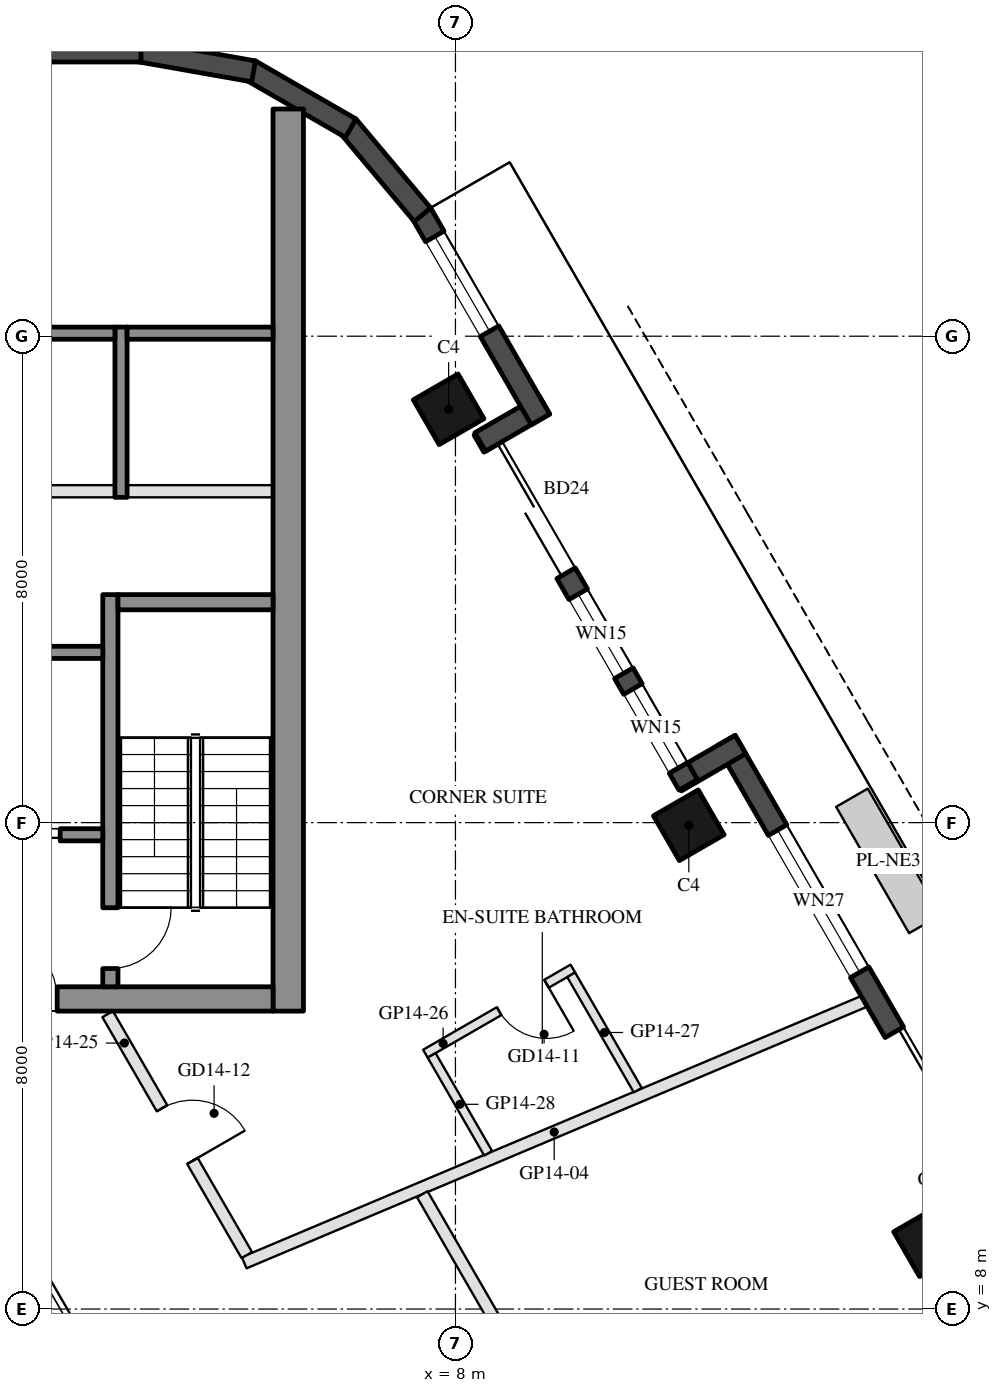
"""IFC4 building model, lengths in metres.
Left out: names, types, materials, properties, quantities, classifications, styles, units other than length and angle.
Written with IfcOpenShell. Run it as: python <this file> out.ifc"""

import sys

from ifc_helpers import new_model, si_unit, direction, frame, frame_2d, origin, origin_2d, place, context, subcontext, project, spatial, rectangle, hollow_rectangle, extrude, element, fill, save


model = new_model("IFC4")
c1 = context("Model", 3, precision=1e-05, world=origin(), true_north=direction((0.0, 1.0)))
c2 = subcontext(c1, "Body", "Model", "MODEL_VIEW")
j1 = project(units=[si_unit("LENGTHUNIT", "METRE"), si_unit("PLANEANGLEUNIT", "RADIAN")], contexts=[c1])
p1 = place(None, origin())
s1 = spatial("IfcSite", under=j1, at=p1, CompositionType="ELEMENT")
p2 = place(p1, origin())
s2 = spatial("IfcBuilding", under=s1, at=p2, CompositionType="ELEMENT")
p3 = place(p2, frame((0.0, 0.0, 165.1)))
s3 = spatial("IfcBuildingStorey", under=s2, at=p3, CompositionType="ELEMENT", Elevation=165.1)
for number, where, z_axis, x_axis in (
    (1, (15.788, 9.115, 0.0), (0.0, 0.0, 1.0), (-0.5, 0.866, 0.0)),
    (2, (11.838, 15.957, 0.0), (0.0, 0.0, 1.0), (-0.5, 0.866, 0.0)),
    (3, (7.888, 22.798, 0.0), (0.0, 0.0, 1.0), (-0.5, 0.866, 0.0)),
):
    element("IfcColumn", number, at=place(p3, frame(where, z_axis=z_axis, x_axis=x_axis)), inside=s3, PredefinedType="COLUMN", context=c2, shape_type="SweptSolid", body=[
        extrude(hollow_rectangle(XDim=0.85, YDim=0.85, WallThickness=0.04, at=origin_2d()), origin(), (0.0, 0.0, 1.0), 3.7),
    ])
p4 = place(p3, frame((17.299, 8.948, 0.0), z_axis=(0.0, 0.0, 1.0), x_axis=(-0.500010041276, 0.866019606374, 0.0)))
e4 = element("IfcWall", 4, at=p4, inside=s3, PredefinedType="SOLIDWALL", context=c2, shape_type="SweptSolid", body=[
    extrude(rectangle(XDim=9.7, YDim=0.35, at=frame_2d((4.85, 0.0))), origin(), (0.0, 0.0, 1.0), 3.55),
])
p5 = place(p4, frame((1.762, 0.0, 0.0)))
e5 = element("IfcOpeningElement", 5, at=p5, cuts=e4, PredefinedType="OPENING", context=c2, shape_type="SweptSolid", body=[
    extrude(rectangle(XDim=2.4, YDim=2.4, at=frame_2d((1.2, 1.2))), frame((0.0, 0.185, 0.0), z_axis=(0.0, -1.0, 0.0), x_axis=(1.0, 0.0, 0.0)), (0.0, 0.0, 1.0), 0.37),
])
p6 = place(p4, frame((5.301, 0.0, 0.3)))
e6 = element("IfcOpeningElement", 6, at=p6, cuts=e4, PredefinedType="OPENING", context=c2, shape_type="SweptSolid", body=[
    extrude(rectangle(XDim=2.7, YDim=2.65, at=frame_2d((1.35, 1.325))), frame((0.0, 0.185, 0.0), z_axis=(0.0, -1.0, 0.0), x_axis=(1.0, 0.0, 0.0)), (0.0, 0.0, 1.0), 0.37),
])
p7 = place(p3, frame((12.688, 17.284, 0.0), z_axis=(0.0, 0.0, 1.0), x_axis=(-0.865955602162, -0.500120880472, 0.0)))
e7 = element("IfcWall", 7, at=p7, inside=s3, PredefinedType="SOLIDWALL", context=c2, shape_type="SweptSolid", body=[
    extrude(rectangle(XDim=1.22, YDim=0.35, at=frame_2d((0.61, 0.0))), origin(), (0.0, 0.0, 1.0), 3.55),
])
p8 = place(p3, frame((11.829, 16.621, 0.0), z_axis=(0.0, 0.0, 1.0), x_axis=(-0.500003597184, 0.866023326939, 0.0)))
e8 = element("IfcWall", 8, at=p8, inside=s3, PredefinedType="SOLIDWALL", context=c2, shape_type="SweptSolid", body=[
    extrude(rectangle(XDim=6.74, YDim=0.35, at=frame_2d((3.37, 0.0))), origin(), (0.0, 0.0, 1.0), 3.55),
])
p9 = place(p8, frame((4.02, 0.0, 0.0)))
e9 = element("IfcOpeningElement", 9, at=p9, cuts=e8, PredefinedType="OPENING", context=c2, shape_type="SweptSolid", body=[
    extrude(rectangle(XDim=2.4, YDim=2.4, at=frame_2d((1.2, 1.2))), frame((0.0, 0.185, 0.0), z_axis=(0.0, -1.0, 0.0), x_axis=(1.0, 0.0, 0.0)), (0.0, 0.0, 1.0), 0.37),
])
p10 = place(p8, frame((0.32, 0.0, 0.3)))
e10 = element("IfcOpeningElement", 10, at=p10, cuts=e8, PredefinedType="OPENING", context=c2, shape_type="SweptSolid", body=[
    extrude(rectangle(XDim=1.5, YDim=2.65, at=frame_2d((0.75, 1.325))), frame((0.0, 0.185, 0.0), z_axis=(0.0, -1.0, 0.0), x_axis=(1.0, 0.0, 0.0)), (0.0, 0.0, 1.0), 0.37),
])
p11 = place(p8, frame((2.12, 0.0, 0.3)))
e11 = element("IfcOpeningElement", 11, at=p11, cuts=e8, PredefinedType="OPENING", context=c2, shape_type="SweptSolid", body=[
    extrude(rectangle(XDim=1.5, YDim=2.65, at=frame_2d((0.75, 1.325))), frame((0.0, 0.185, 0.0), z_axis=(0.0, -1.0, 0.0), x_axis=(1.0, 0.0, 0.0)), (0.0, 0.0, 1.0), 0.37),
])
p12 = place(p3, frame((8.406, 22.26, 0.0), z_axis=(0.0, 0.0, 1.0), x_axis=(0.865955602162, 0.500120880472, 0.0)))
e12 = element("IfcWall", 12, at=p12, inside=s3, PredefinedType="SOLIDWALL", context=c2, shape_type="SweptSolid", body=[
    extrude(rectangle(XDim=1.22, YDim=0.35, at=frame_2d((0.61, 0.0))), origin(), (0.0, 0.0, 1.0), 3.55),
])
p13 = place(p3, frame((9.398, 22.631, 0.0), z_axis=(0.0, 0.0, 1.0), x_axis=(-0.499954521343, 0.866051659307, 0.0)))
e13 = element("IfcWall", 13, at=p13, inside=s3, PredefinedType="SOLIDWALL", context=c2, shape_type="SweptSolid", body=[
    extrude(rectangle(XDim=3.916, YDim=0.35, at=frame_2d((1.958, 0.0))), origin(), (0.0, 0.0, 1.0), 3.55),
])
p14 = place(p13, frame((1.675, 0.0, 0.3)))
e14 = element("IfcOpeningElement", 14, at=p14, cuts=e13, PredefinedType="OPENING", context=c2, shape_type="SweptSolid", body=[
    extrude(rectangle(XDim=1.8, YDim=2.65, at=frame_2d((0.9, 1.325))), frame((0.0, 0.185, 0.0), z_axis=(0.0, -1.0, 0.0), x_axis=(1.0, 0.0, 0.0)), (0.0, 0.0, 1.0), 0.37),
])
p15 = place(p3, frame((7.458, 25.998, 0.0), z_axis=(0.0, 0.0, 1.0), x_axis=(-0.642808304945, 0.766027077259, 0.0)))
e15 = element("IfcWall", 15, at=p15, inside=s3, PredefinedType="SOLIDWALL", context=c2, shape_type="SweptSolid", body=[
    extrude(rectangle(XDim=1.91, YDim=0.35, at=frame_2d((0.955, 0.0))), origin(), (0.0, 0.0, 1.0), 3.55),
])
for number, where, z_axis, x_axis in (
    (16, (6.277, 27.422, 0.0), (0.0, 0.0, 1.0), (-0.866, 0.5, 0.0)),
    (17, (4.68, 28.356, 0.0), (0.0, 0.0, 1.0), (-0.985, 0.174, 0.0)),
):
    element("IfcWall", number, at=place(p3, frame(where, z_axis=z_axis, x_axis=x_axis)), inside=s3, PredefinedType="SOLIDWALL", context=c2, shape_type="SweptSolid", body=[
        extrude(rectangle(XDim=1.91, YDim=0.35, at=frame_2d((0.955, 0.0))), origin(), (0.0, 0.0, 1.0), 3.55),
    ])
p16 = place(p3, frame((2.829, 28.685, 0.0), z_axis=(0.0, 0.0, 1.0), x_axis=(-1.0, 0.0, 0.0)))
e18 = element("IfcWall", 18, at=p16, inside=s3, PredefinedType="SOLIDWALL", context=c2, shape_type="SweptSolid", body=[
    extrude(rectangle(XDim=5.658, YDim=0.35, at=frame_2d((2.829, 0.0))), origin(), (0.0, 0.0, 1.0), 3.55),
])
p17 = place(p3, frame((5.25, 12.9, 0.0), z_axis=(0.0, 0.0, 1.0), x_axis=(0.0, 1.0, 0.0)))
e19 = element("IfcWall", 19, at=p17, inside=s3, PredefinedType="SHEAR", context=c2, shape_type="SweptSolid", body=[
    extrude(rectangle(XDim=14.837, YDim=0.5, at=frame_2d((7.418, 0.0))), origin(), (0.0, 0.0, 1.0), 3.5),
])
p18 = place(p3, frame((5.0, 13.1, 0.0), z_axis=(0.0, 0.0, 1.0), x_axis=(-1.0, 0.0, 0.0)))
e20 = element("IfcWall", 20, at=p18, inside=s3, PredefinedType="SHEAR", context=c2, shape_type="SweptSolid", body=[
    extrude(rectangle(XDim=10.0, YDim=0.4, at=frame_2d((5.0, 0.0))), origin(), (0.0, 0.0, 1.0), 3.5),
])
p19 = place(p18, frame((3.55, 0.0, 0.0)))
e21 = element("IfcOpeningElement", 21, at=p19, cuts=e20, PredefinedType="OPENING", context=c2, shape_type="SweptSolid", body=[
    extrude(rectangle(XDim=1.1, YDim=2.1, at=frame_2d((0.55, 1.05))), frame((0.0, 0.21, 0.0), z_axis=(0.0, -1.0, 0.0), x_axis=(1.0, 0.0, 0.0)), (0.0, 0.0, 1.0), 0.42),
])
p20 = place(p18, frame((5.85, 0.0, 0.0)))
e22 = element("IfcOpeningElement", 22, at=p20, cuts=e20, PredefinedType="OPENING", context=c2, shape_type="SweptSolid", body=[
    extrude(rectangle(XDim=1.4, YDim=2.1, at=frame_2d((0.7, 1.05))), frame((0.0, 0.21, 0.0), z_axis=(0.0, -1.0, 0.0), x_axis=(1.0, 0.0, 0.0)), (0.0, 0.0, 1.0), 0.42),
])
p21 = place(p3, frame((2.325, 13.3, 0.0), z_axis=(0.0, 0.0, 1.0), x_axis=(0.0, 1.0, 0.0)))
e23 = element("IfcWall", 23, at=p21, inside=s3, PredefinedType="SHEAR", context=c2, shape_type="SweptSolid", body=[
    extrude(rectangle(XDim=6.45, YDim=0.25, at=frame_2d((3.225, 0.0))), origin(), (0.0, 0.0, 1.0), 3.5),
])
p22 = place(p21, frame((0.3, 0.0, 0.0)))
e24 = element("IfcOpeningElement", 24, at=p22, cuts=e23, PredefinedType="OPENING", context=c2, shape_type="SweptSolid", body=[
    extrude(rectangle(XDim=1.0, YDim=2.1, at=frame_2d((0.5, 1.05))), frame((0.0, 0.135, 0.0), z_axis=(0.0, -1.0, 0.0), x_axis=(1.0, 0.0, 0.0)), (0.0, 0.0, 1.0), 0.27),
])
p23 = place(p3, frame((5.0, 19.625, 0.0), z_axis=(0.0, 0.0, 1.0), x_axis=(-1.0, 0.0, 0.0)))
e25 = element("IfcWall", 25, at=p23, inside=s3, PredefinedType="SHEAR", context=c2, shape_type="SweptSolid", body=[
    extrude(rectangle(XDim=2.55, YDim=0.25, at=frame_2d((1.275, 0.0))), origin(), (0.0, 0.0, 1.0), 3.5),
])
p24 = place(p3, frame((2.2, 18.8, 0.0), z_axis=(0.0, 0.0, 1.0), x_axis=(-1.0, 0.0, 0.0)))
e26 = element("IfcWall", 26, at=p24, inside=s3, PredefinedType="SHEAR", context=c2, shape_type="SweptSolid", body=[
    extrude(rectangle(XDim=2.8, YDim=0.2, at=frame_2d((1.4, 0.0))), origin(), (0.0, 0.0, 1.0), 3.5),
])
p25 = place(p3, frame((2.2, 15.8, 0.0), z_axis=(0.0, 0.0, 1.0), x_axis=(-1.0, 0.0, 0.0)))
e27 = element("IfcWall", 27, at=p25, inside=s3, PredefinedType="SHEAR", context=c2, shape_type="SweptSolid", body=[
    extrude(rectangle(XDim=2.8, YDim=0.2, at=frame_2d((1.4, 0.0))), origin(), (0.0, 0.0, 1.0), 3.5),
])
p26 = place(p25, frame((0.7, 0.0, 0.0)))
e28 = element("IfcOpeningElement", 28, at=p26, cuts=e27, PredefinedType="OPENING", context=c2, shape_type="SweptSolid", body=[
    extrude(rectangle(XDim=1.2, YDim=2.1, at=frame_2d((0.6, 1.05))), frame((0.0, 0.11, 0.0), z_axis=(0.0, -1.0, 0.0), x_axis=(1.0, 0.0, 0.0)), (0.0, 0.0, 1.0), 0.22),
])
p27 = place(p3, frame((2.5, 21.35, 0.0), z_axis=(0.0, 0.0, 1.0), x_axis=(0.0, 1.0, 0.0)))
e29 = element("IfcWall", 29, at=p27, inside=s3, PredefinedType="SHEAR", context=c2, shape_type="SweptSolid", body=[
    extrude(rectangle(XDim=2.8, YDim=0.2, at=frame_2d((1.4, 0.0))), origin(), (0.0, 0.0, 1.0), 3.5),
])
p28 = place(p3, frame((5.0, 24.05, 0.0), z_axis=(0.0, 0.0, 1.0), x_axis=(-1.0, 0.0, 0.0)))
e30 = element("IfcWall", 30, at=p28, inside=s3, PredefinedType="SHEAR", context=c2, shape_type="SweptSolid", body=[
    extrude(rectangle(XDim=2.4, YDim=0.2, at=frame_2d((1.2, 0.0))), origin(), (0.0, 0.0, 1.0), 3.5),
])
p29 = place(p3, frame((2.4, 24.05, 0.0), z_axis=(0.0, 0.0, 1.0), x_axis=(-1.0, 0.0, 0.0)))
e31 = element("IfcWall", 31, at=p29, inside=s3, PredefinedType="SHEAR", context=c2, shape_type="SweptSolid", body=[
    extrude(rectangle(XDim=2.8, YDim=0.2, at=frame_2d((1.4, 0.0))), origin(), (0.0, 0.0, 1.0), 3.5),
])
p30 = place(p3, frame((5.0, 21.45, 0.0), z_axis=(0.0, 0.0, 1.0), x_axis=(-1.0, 0.0, 0.0)))
e32 = element("IfcWall", 32, at=p30, inside=s3, PredefinedType="PARTITIONING", context=c2, shape_type="SweptSolid", body=[
    extrude(rectangle(XDim=2.4, YDim=0.2, at=frame_2d((1.2, 0.0))), origin(), (0.0, 0.0, 1.0), 3.5),
])
p31 = place(p3, frame((2.4, 21.45, 0.0), z_axis=(0.0, 0.0, 1.0), x_axis=(-1.0, 0.0, 0.0)))
e33 = element("IfcWall", 33, at=p31, inside=s3, PredefinedType="PARTITIONING", context=c2, shape_type="SweptSolid", body=[
    extrude(rectangle(XDim=2.8, YDim=0.2, at=frame_2d((1.4, 0.0))), origin(), (0.0, 0.0, 1.0), 3.5),
])
p32 = place(p3, frame((14.722, 13.061, 0.0), z_axis=(0.0, 0.0, 1.0), x_axis=(-0.921447968583, -0.388501790465, 0.0)))
e34 = element("IfcWall", 34, at=p32, inside=s3, PredefinedType="PARTITIONING", context=c2, shape_type="SweptSolid", body=[
    extrude(rectangle(XDim=11.066, YDim=0.2, at=frame_2d((5.533, 0.0))), origin(), (0.0, 0.0, 1.0), 2.95),
])
p33 = place(p3, frame((7.455, 9.888, 0.0), z_axis=(0.0, 0.0, 1.0), x_axis=(0.499995688794, -0.866027892846, 0.0)))
e35 = element("IfcWall", 35, at=p33, inside=s3, PredefinedType="PARTITIONING", context=c2, shape_type="SweptSolid", body=[
    extrude(rectangle(XDim=9.307, YDim=0.2, at=frame_2d((4.654, 0.0))), origin(), (0.0, 0.0, 1.0), 2.95),
])
p34 = place(p33, frame((5.849, 0.0, 0.0)))
e36 = element("IfcOpeningElement", 36, at=p34, cuts=e35, PredefinedType="OPENING", context=c2, shape_type="SweptSolid", body=[
    extrude(rectangle(XDim=1.0, YDim=2.1, at=frame_2d((0.5, 1.05))), frame((0.0, 0.11, 0.0), z_axis=(0.0, -1.0, 0.0), x_axis=(1.0, 0.0, 0.0)), (0.0, 0.0, 1.0), 0.22),
])
p35 = place(p3, frame((2.281, 12.85, 0.0), z_axis=(0.0, 0.0, 1.0), x_axis=(0.500030411023, -0.86600784526, 0.0)))
e37 = element("IfcWall", 37, at=p35, inside=s3, PredefinedType="PARTITIONING", context=c2, shape_type="SweptSolid", body=[
    extrude(rectangle(XDim=4.575, YDim=0.2, at=frame_2d((2.288, 0.0))), origin(), (0.0, 0.0, 1.0), 2.95),
])
p36 = place(p35, frame((1.787, 0.0, 0.0)))
e38 = element("IfcOpeningElement", 38, at=p36, cuts=e37, PredefinedType="OPENING", context=c2, shape_type="SweptSolid", body=[
    extrude(rectangle(XDim=1.0, YDim=2.1, at=frame_2d((0.5, 1.05))), frame((0.0, 0.11, 0.0), z_axis=(0.0, -1.0, 0.0), x_axis=(1.0, 0.0, 0.0)), (0.0, 0.0, 1.0), 0.22),
])
p37 = place(p3, frame((9.931, 13.6, 0.0), z_axis=(0.0, 0.0, 1.0), x_axis=(-0.866034573852, -0.49998411664, 0.0)))
e39 = element("IfcWall", 39, at=p37, inside=s3, PredefinedType="PARTITIONING", context=c2, shape_type="SweptSolid", body=[
    extrude(rectangle(XDim=2.8, YDim=0.15, at=frame_2d((1.4, 0.0))), origin(), (0.0, 0.0, 1.0), 3.55),
])
p38 = place(p37, frame((0.5, 0.0, 0.0)))
e40 = element("IfcOpeningElement", 40, at=p38, cuts=e39, PredefinedType="OPENING", context=c2, shape_type="SweptSolid", body=[
    extrude(rectangle(XDim=0.9, YDim=2.1, at=frame_2d((0.45, 1.05))), frame((0.0, 0.085, 0.0), z_axis=(0.0, -1.0, 0.0), x_axis=(1.0, 0.0, 0.0)), (0.0, 0.0, 1.0), 0.17),
])
p39 = place(p3, frame((10.999, 11.6, 0.0), z_axis=(0.0, 0.0, 1.0), x_axis=(-0.499937856693, 0.866061279267, 0.0)))
e41 = element("IfcWall", 41, at=p39, inside=s3, PredefinedType="PARTITIONING", context=c2, shape_type="SweptSolid", body=[
    extrude(rectangle(XDim=2.191, YDim=0.15, at=frame_2d((1.096, 0.0))), origin(), (0.0, 0.0, 1.0), 3.55),
])
p40 = place(p3, frame((8.538, 10.562, 0.0), z_axis=(0.0, 0.0, 1.0), x_axis=(-0.500036928615, 0.866004081989, 0.0)))
e42 = element("IfcWall", 42, at=p40, inside=s3, PredefinedType="PARTITIONING", context=c2, shape_type="SweptSolid", body=[
    extrude(rectangle(XDim=1.859, YDim=0.15, at=frame_2d((0.93, 0.0))), origin(), (0.0, 0.0, 1.0), 3.55),
])
p41 = place(p5, frame((2.4, 0.0, 0.0), z_axis=(0.0, 0.0, 1.0), x_axis=(-1.0, 0.0, 0.0)))
e43 = element("IfcDoor", 43, at=p41, inside=s3, OperationType="SLIDING_TO_LEFT", PredefinedType="DOOR", context=c2, shape_type="SweptSolid", body=[
    extrude(rectangle(XDim=2.4, YDim=2.4, at=frame_2d((1.2, 1.2))), frame((0.0, 0.025, 0.0), z_axis=(0.0, -1.0, 0.0), x_axis=(1.0, 0.0, 0.0)), (0.0, 0.0, 1.0), 0.05),
])
fill(e5, e43)
p42 = place(p6, origin())
e44 = element("IfcWindow", 44, at=p42, inside=s3, PartitioningType="SINGLE_PANEL", PredefinedType="WINDOW", context=c2, shape_type="SweptSolid", body=[
    extrude(rectangle(XDim=2.7, YDim=2.65, at=frame_2d((1.35, 1.325))), frame((0.0, 0.03, 0.0), z_axis=(0.0, -1.0, 0.0), x_axis=(1.0, 0.0, 0.0)), (0.0, 0.0, 1.0), 0.06),
])
fill(e6, e44)
p43 = place(p9, frame((2.4, 0.0, 0.0), z_axis=(0.0, 0.0, 1.0), x_axis=(-1.0, 0.0, 0.0)))
e45 = element("IfcDoor", 45, at=p43, inside=s3, OperationType="SLIDING_TO_LEFT", PredefinedType="DOOR", context=c2, shape_type="SweptSolid", body=[
    extrude(rectangle(XDim=2.4, YDim=2.4, at=frame_2d((1.2, 1.2))), frame((0.0, 0.025, 0.0), z_axis=(0.0, -1.0, 0.0), x_axis=(1.0, 0.0, 0.0)), (0.0, 0.0, 1.0), 0.05),
])
fill(e9, e45)
p44 = place(p10, origin())
e46 = element("IfcWindow", 46, at=p44, inside=s3, PartitioningType="SINGLE_PANEL", PredefinedType="WINDOW", context=c2, shape_type="SweptSolid", body=[
    extrude(rectangle(XDim=1.5, YDim=2.65, at=frame_2d((0.75, 1.325))), frame((0.0, 0.03, 0.0), z_axis=(0.0, -1.0, 0.0), x_axis=(1.0, 0.0, 0.0)), (0.0, 0.0, 1.0), 0.06),
])
fill(e10, e46)
p45 = place(p11, origin())
e47 = element("IfcWindow", 47, at=p45, inside=s3, PartitioningType="SINGLE_PANEL", PredefinedType="WINDOW", context=c2, shape_type="SweptSolid", body=[
    extrude(rectangle(XDim=1.5, YDim=2.65, at=frame_2d((0.75, 1.325))), frame((0.0, 0.03, 0.0), z_axis=(0.0, -1.0, 0.0), x_axis=(1.0, 0.0, 0.0)), (0.0, 0.0, 1.0), 0.06),
])
fill(e11, e47)
p46 = place(p14, origin())
e48 = element("IfcWindow", 48, at=p46, inside=s3, PartitioningType="SINGLE_PANEL", PredefinedType="WINDOW", context=c2, shape_type="SweptSolid", body=[
    extrude(rectangle(XDim=1.8, YDim=2.65, at=frame_2d((0.9, 1.325))), frame((0.0, 0.03, 0.0), z_axis=(0.0, -1.0, 0.0), x_axis=(1.0, 0.0, 0.0)), (0.0, 0.0, 1.0), 0.06),
])
fill(e14, e48)
p47 = place(p26, origin())
e49 = element("IfcDoor", 49, at=p47, inside=s3, OperationType="DOUBLE_DOOR_SLIDING", PredefinedType="DOOR", context=c2, shape_type="SweptSolid", body=[
    extrude(rectangle(XDim=1.2, YDim=2.1, at=frame_2d((0.6, 1.05))), frame((0.0, 0.025, 0.0), z_axis=(0.0, -1.0, 0.0), x_axis=(1.0, 0.0, 0.0)), (0.0, 0.0, 1.0), 0.05),
])
fill(e28, e49)
p48 = place(p19, frame((1.1, 0.0, 0.0), z_axis=(0.0, 0.0, 1.0), x_axis=(-1.0, 0.0, 0.0)))
e50 = element("IfcDoor", 50, at=p48, inside=s3, OperationType="SINGLE_SWING_LEFT", PredefinedType="DOOR", context=c2, shape_type="SweptSolid", body=[
    extrude(rectangle(XDim=1.1, YDim=2.1, at=frame_2d((0.55, 1.05))), frame((0.0, 0.025, 0.0), z_axis=(0.0, -1.0, 0.0), x_axis=(1.0, 0.0, 0.0)), (0.0, 0.0, 1.0), 0.05),
])
fill(e21, e50)
p49 = place(p22, frame((1.0, 0.0, 0.0), z_axis=(0.0, 0.0, 1.0), x_axis=(-1.0, 0.0, 0.0)))
e51 = element("IfcDoor", 51, at=p49, inside=s3, OperationType="SINGLE_SWING_LEFT", PredefinedType="DOOR", context=c2, shape_type="SweptSolid", body=[
    extrude(rectangle(XDim=1.0, YDim=2.1, at=frame_2d((0.5, 1.05))), frame((0.0, 0.025, 0.0), z_axis=(0.0, -1.0, 0.0), x_axis=(1.0, 0.0, 0.0)), (0.0, 0.0, 1.0), 0.05),
])
fill(e24, e51)
p50 = place(p38, origin())
e52 = element("IfcDoor", 52, at=p50, inside=s3, OperationType="SINGLE_SWING_LEFT", PredefinedType="DOOR", context=c2, shape_type="SweptSolid", body=[
    extrude(rectangle(XDim=0.9, YDim=2.1, at=frame_2d((0.45, 1.05))), frame((0.0, 0.025, 0.0), z_axis=(0.0, -1.0, 0.0), x_axis=(1.0, 0.0, 0.0)), (0.0, 0.0, 1.0), 0.05),
])
fill(e40, e52)
p51 = place(p36, origin())
e53 = element("IfcDoor", 53, at=p51, inside=s3, OperationType="SINGLE_SWING_RIGHT", PredefinedType="DOOR", context=c2, shape_type="SweptSolid", body=[
    extrude(rectangle(XDim=1.0, YDim=2.1, at=frame_2d((0.5, 1.05))), frame((0.0, 0.025, 0.0), z_axis=(0.0, -1.0, 0.0), x_axis=(1.0, 0.0, 0.0)), (0.0, 0.0, 1.0), 0.05),
])
fill(e38, e53)
save(model, sys.argv[1])
